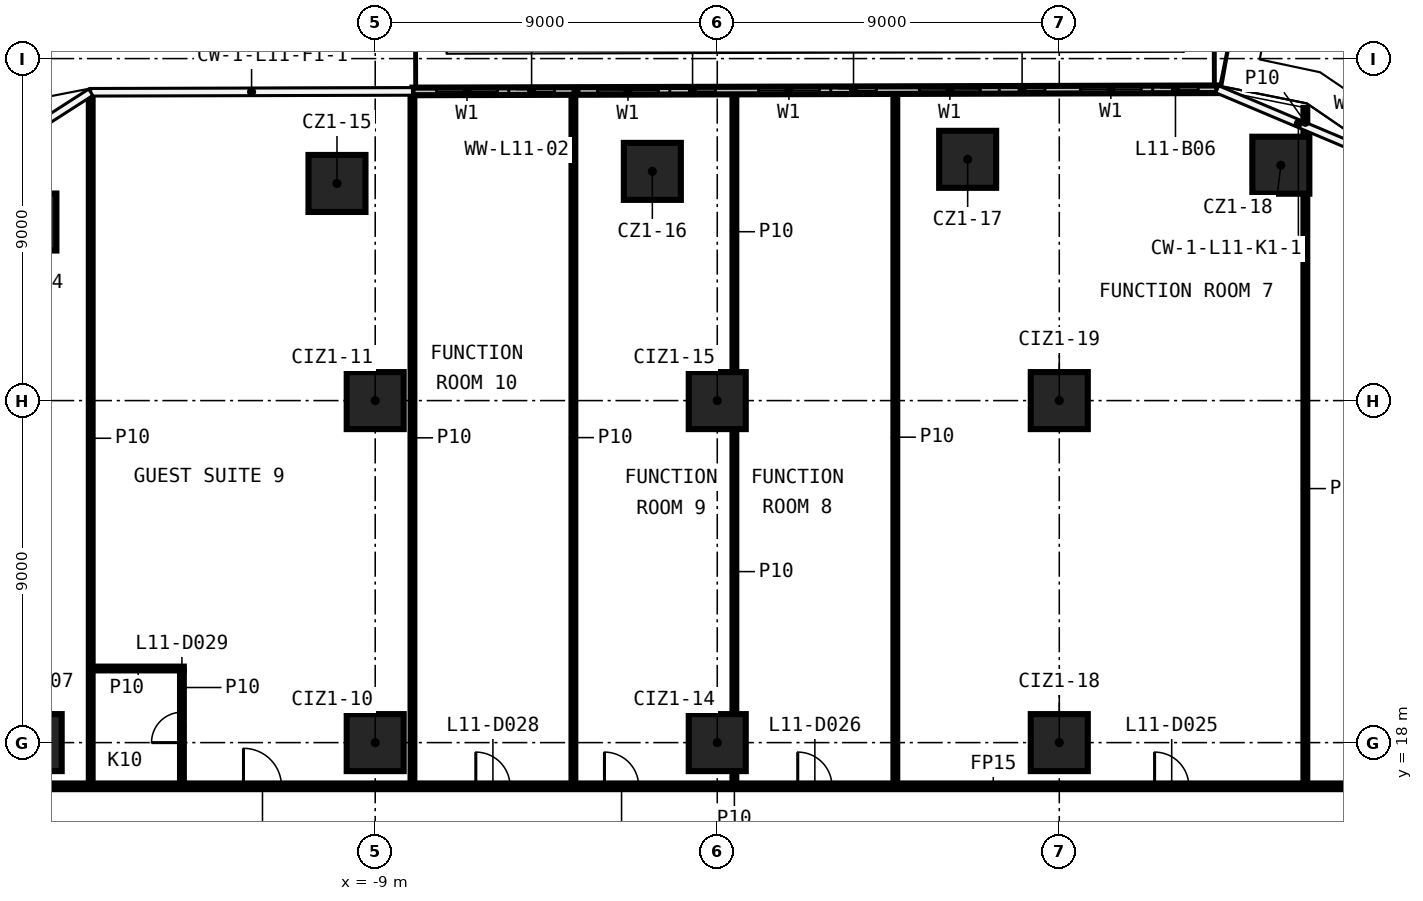
"""IFC4 building model, lengths in metres.
Left out: names, types, materials, properties, quantities, classifications, styles, units other than length and angle.
Written with IfcOpenShell. Run it as: python <this file> out.ifc"""

import sys

from ifc_helpers import new_model, si_unit, direction, frame, frame_2d, origin, origin_2d, place, context, subcontext, project, spatial, rectangle, extrude, element, fill, save


model = new_model("IFC4")
c1 = context("Model", 3, precision=1e-05, world=origin(), true_north=direction((0.0, 1.0)))
c2 = subcontext(c1, "Body", "Model", "MODEL_VIEW")
j1 = project(units=[si_unit("LENGTHUNIT", "METRE"), si_unit("PLANEANGLEUNIT", "RADIAN")], contexts=[c1])
p1 = place(None, origin())
s1 = spatial("IfcSite", under=j1, at=p1, CompositionType="ELEMENT")
p2 = place(p1, origin())
s2 = spatial("IfcBuilding", under=s1, at=p2, CompositionType="ELEMENT")
p3 = place(p2, frame((0.0, 0.0, 62.5)))
s3 = spatial("IfcBuildingStorey", under=s2, at=p3, CompositionType="ELEMENT", Elevation=62.5)
for number, where, z_axis, x_axis in (
    (1, (-18.139, 31.699, 0.0), (0.0, 0.0, 1.0), (1.0, 0.0, 0.0)),
    (2, (-10.006, 32.714, 0.0), (0.0, 0.0, 1.0), (1.0, 0.0, 0.0)),
    (3, (-1.708, 33.032, 0.0), (0.0, 0.0, 1.0), (1.0, 0.0, 0.0)),
    (4, (6.589, 33.349, 0.0), (0.0, 0.0, 1.0), (1.0, 0.0, 0.0)),
    (5, (14.83, 33.194, 0.0), (0.0, 0.0, 1.0), (1.0, 0.0, 0.0)),
    (6, (-18.0, 18.0, 0.0), (0.0, 0.0, 1.0), (1.0, 0.0, 0.0)),
    (7, (-9.0, 18.0, 0.0), (0.0, 0.0, 1.0), (1.0, 0.0, 0.0)),
    (8, (-9.0, 27.0, 0.0), (0.0, 0.0, 1.0), (1.0, 0.0, 0.0)),
    (9, (0.0, 18.0, 0.0), (0.0, 0.0, 1.0), (1.0, 0.0, 0.0)),
    (10, (0.0, 27.0, 0.0), (0.0, 0.0, 1.0), (1.0, 0.0, 0.0)),
    (11, (9.0, 18.0, 0.0), (0.0, 0.0, 1.0), (1.0, 0.0, 0.0)),
    (12, (9.0, 27.0, 0.0), (0.0, 0.0, 1.0), (1.0, 0.0, 0.0)),
):
    element("IfcColumn", number, at=place(p3, frame(where, z_axis=z_axis, x_axis=x_axis)), inside=s3, PredefinedType="COLUMN", context=c2, shape_type="SweptSolid", body=[
        extrude(rectangle(XDim=1.5, YDim=1.5, at=origin_2d()), origin(), (0.0, 0.0, 1.0), 3.3),
    ])
p4 = place(p3, frame((-19.925, 16.85, 0.0), z_axis=(0.0, 0.0, 1.0), x_axis=(1.0, 0.0, 0.0)))
e13 = element("IfcWall", 13, at=p4, inside=s3, PredefinedType="PARTITIONING", context=c2, shape_type="SweptSolid", body=[
    extrude(rectangle(XDim=39.85, YDim=0.15, at=frame_2d((19.925, 0.0))), origin(), (0.0, 0.0, 1.0), 3.3),
])
p5 = place(p4, frame((31.433, 0.0, 0.0)))
e14 = element("IfcOpeningElement", 14, at=p5, cuts=e13, PredefinedType="OPENING", context=c2, shape_type="SweptSolid", body=[
    extrude(rectangle(XDim=0.9, YDim=2.1, at=frame_2d((0.45, 1.05))), frame((0.0, 0.085, 0.0), z_axis=(0.0, -1.0, 0.0), x_axis=(1.0, 0.0, 0.0)), (0.0, 0.0, 1.0), 0.17),
])
p6 = place(p4, frame((22.043, 0.0, 0.0)))
e15 = element("IfcOpeningElement", 15, at=p6, cuts=e13, PredefinedType="OPENING", context=c2, shape_type="SweptSolid", body=[
    extrude(rectangle(XDim=0.9, YDim=2.1, at=frame_2d((0.45, 1.05))), frame((0.0, 0.085, 0.0), z_axis=(0.0, -1.0, 0.0), x_axis=(1.0, 0.0, 0.0)), (0.0, 0.0, 1.0), 0.17),
])
p7 = place(p4, frame((16.957, 0.0, 0.0)))
e16 = element("IfcOpeningElement", 16, at=p7, cuts=e13, PredefinedType="OPENING", context=c2, shape_type="SweptSolid", body=[
    extrude(rectangle(XDim=0.9, YDim=2.1, at=frame_2d((0.45, 1.05))), frame((0.0, 0.085, 0.0), z_axis=(0.0, -1.0, 0.0), x_axis=(1.0, 0.0, 0.0)), (0.0, 0.0, 1.0), 0.17),
])
p8 = place(p4, frame((13.572, 0.0, 0.0)))
e17 = element("IfcOpeningElement", 17, at=p8, cuts=e13, PredefinedType="OPENING", context=c2, shape_type="SweptSolid", body=[
    extrude(rectangle(XDim=0.9, YDim=2.1, at=frame_2d((0.45, 1.05))), frame((0.0, 0.085, 0.0), z_axis=(0.0, -1.0, 0.0), x_axis=(1.0, 0.0, 0.0)), (0.0, 0.0, 1.0), 0.17),
])
p9 = place(p4, frame((7.458, 0.0, 0.0)))
e18 = element("IfcOpeningElement", 18, at=p9, cuts=e13, PredefinedType="OPENING", context=c2, shape_type="SweptSolid", body=[
    extrude(rectangle(XDim=1.0, YDim=2.1, at=frame_2d((0.5, 1.05))), frame((0.0, 0.085, 0.0), z_axis=(0.0, -1.0, 0.0), x_axis=(1.0, 0.0, 0.0)), (0.0, 0.0, 1.0), 0.17),
])
p10 = place(p3, frame((-16.436, 19.95, 0.0), z_axis=(0.0, 0.0, 1.0), x_axis=(1.0, 0.0, 0.0)))
e19 = element("IfcWall", 19, at=p10, inside=s3, PredefinedType="PARTITIONING", context=c2, shape_type="SweptSolid", body=[
    extrude(rectangle(XDim=2.4, YDim=0.1, at=frame_2d((1.2, 0.0))), origin(), (0.0, 0.0, 1.0), 3.3),
])
p11 = place(p3, frame((15.475, 16.925, 0.0), z_axis=(0.0, 0.0, 1.0), x_axis=(0.0, 1.0, 0.0)))
e20 = element("IfcWall", 20, at=p11, inside=s3, PredefinedType="PARTITIONING", context=c2, shape_type="SweptSolid", body=[
    extrude(rectangle(XDim=15.519, YDim=0.1, at=frame_2d((7.76, 0.0))), origin(), (0.0, 0.0, 1.0), 3.3),
])
p12 = place(p3, frame((15.475, 33.944, 0.0), z_axis=(0.0, 0.0, 1.0), x_axis=(0.0, 1.0, 0.0)))
e21 = element("IfcWall", 21, at=p12, inside=s3, PredefinedType="PARTITIONING", context=c2, shape_type="SweptSolid", body=[
    extrude(rectangle(XDim=0.759, YDim=0.1, at=frame_2d((0.379, 0.0))), origin(), (0.0, 0.0, 1.0), 3.3),
])
p13 = place(p3, frame((4.686, 16.925, 0.0), z_axis=(0.0, 0.0, 1.0), x_axis=(0.0, 1.0, 0.0)))
e22 = element("IfcWall", 22, at=p13, inside=s3, PredefinedType="PARTITIONING", context=c2, shape_type="SweptSolid", body=[
    extrude(rectangle(XDim=18.225, YDim=0.1, at=frame_2d((9.112, 0.0))), origin(), (0.0, 0.0, 1.0), 3.3),
])
p14 = place(p3, frame((0.451, 16.925, 0.0), z_axis=(0.0, 0.0, 1.0), x_axis=(0.0, 1.0, 0.0)))
e23 = element("IfcWall", 23, at=p14, inside=s3, PredefinedType="PARTITIONING", context=c2, shape_type="SweptSolid", body=[
    extrude(rectangle(XDim=0.325, YDim=0.1, at=frame_2d((0.163, 0.0))), origin(), (0.0, 0.0, 1.0), 3.3),
])
p15 = place(p3, frame((0.451, 18.75, 0.0), z_axis=(0.0, 0.0, 1.0), x_axis=(0.0, 1.0, 0.0)))
e24 = element("IfcWall", 24, at=p15, inside=s3, PredefinedType="PARTITIONING", context=c2, shape_type="SweptSolid", body=[
    extrude(rectangle(XDim=7.5, YDim=0.1, at=frame_2d((3.75, 0.0))), origin(), (0.0, 0.0, 1.0), 3.3),
])
p16 = place(p3, frame((0.451, 27.75, 0.0), z_axis=(0.0, 0.0, 1.0), x_axis=(0.0, 1.0, 0.0)))
e25 = element("IfcWall", 25, at=p16, inside=s3, PredefinedType="PARTITIONING", context=c2, shape_type="SweptSolid", body=[
    extrude(rectangle(XDim=7.389, YDim=0.1, at=frame_2d((3.694, 0.0))), origin(), (0.0, 0.0, 1.0), 3.3),
])
p17 = place(p3, frame((-3.785, 16.925, 0.0), z_axis=(0.0, 0.0, 1.0), x_axis=(0.0, 1.0, 0.0)))
e26 = element("IfcWall", 26, at=p17, inside=s3, PredefinedType="PARTITIONING", context=c2, shape_type="SweptSolid", body=[
    extrude(rectangle(XDim=18.202, YDim=0.1, at=frame_2d((9.101, 0.0))), origin(), (0.0, 0.0, 1.0), 3.3),
])
p18 = place(p3, frame((-8.02, 16.925, 0.0), z_axis=(0.0, 0.0, 1.0), x_axis=(0.0, 1.0, 0.0)))
e27 = element("IfcWall", 27, at=p18, inside=s3, PredefinedType="PARTITIONING", context=c2, shape_type="SweptSolid", body=[
    extrude(rectangle(XDim=18.191, YDim=0.1, at=frame_2d((9.096, 0.0))), origin(), (0.0, 0.0, 1.0), 3.3),
])
p19 = place(p3, frame((-14.086, 16.925, 0.0), z_axis=(0.0, 0.0, 1.0), x_axis=(0.0, 1.0, 0.0)))
e28 = element("IfcWall", 28, at=p19, inside=s3, PredefinedType="PARTITIONING", context=c2, shape_type="SweptSolid", body=[
    extrude(rectangle(XDim=2.975, YDim=0.1, at=frame_2d((1.487, 0.0))), origin(), (0.0, 0.0, 1.0), 3.3),
])
p20 = place(p19, frame((1.075, 0.0, 0.0)))
e29 = element("IfcOpeningElement", 29, at=p20, cuts=e28, PredefinedType="OPENING", context=c2, shape_type="SweptSolid", body=[
    extrude(rectangle(XDim=0.8, YDim=2.1, at=frame_2d((0.4, 1.05))), frame((0.0, 0.06, 0.0), z_axis=(0.0, -1.0, 0.0), x_axis=(1.0, 0.0, 0.0)), (0.0, 0.0, 1.0), 0.12),
])
p21 = place(p3, frame((-16.486, 16.925, 0.0), z_axis=(0.0, 0.0, 1.0), x_axis=(0.0, 1.0, 0.0)))
e30 = element("IfcWall", 30, at=p21, inside=s3, PredefinedType="PARTITIONING", context=c2, shape_type="SweptSolid", body=[
    extrude(rectangle(XDim=18.168, YDim=0.1, at=frame_2d((9.084, 0.0))), origin(), (0.0, 0.0, 1.0), 3.3),
])
p22 = place(p3, frame((13.157, 35.193, 0.0), z_axis=(0.0, 0.0, 1.0), x_axis=(-0.99999645413, -0.00266302965, 0.0)))
e31 = element("IfcWall", 31, at=p22, inside=s3, PredefinedType="SOLIDWALL", context=c2, shape_type="SweptSolid", body=[
    extrude(rectangle(XDim=21.177, YDim=0.2, at=frame_2d((10.589, 0.0))), origin(), (0.0, 0.0, 1.0), 3.3),
])
p23 = place(p22, frame((2.0, 0.0, 0.6)))
e32 = element("IfcOpeningElement", 32, at=p23, cuts=e31, PredefinedType="OPENING", context=c2, shape_type="SweptSolid", body=[
    extrude(rectangle(XDim=1.6, YDim=2.4, at=frame_2d((0.8, 1.2))), frame((0.0, 0.11, 0.0), z_axis=(0.0, -1.0, 0.0), x_axis=(1.0, 0.0, 0.0)), (0.0, 0.0, 1.0), 0.22),
])
p24 = place(p22, frame((0.5, 0.0, 0.0)))
e33 = element("IfcOpeningElement", 33, at=p24, cuts=e31, PredefinedType="OPENING", context=c2, shape_type="SweptSolid", body=[
    extrude(rectangle(XDim=1.2, YDim=2.4, at=frame_2d((0.6, 1.2))), frame((0.0, 0.11, 0.0), z_axis=(0.0, -1.0, 0.0), x_axis=(1.0, 0.0, 0.0)), (0.0, 0.0, 1.0), 0.22),
])
p25 = place(p22, frame((6.236, 0.0, 0.6)))
e34 = element("IfcOpeningElement", 34, at=p25, cuts=e31, PredefinedType="OPENING", context=c2, shape_type="SweptSolid", body=[
    extrude(rectangle(XDim=1.6, YDim=2.4, at=frame_2d((0.8, 1.2))), frame((0.0, 0.11, 0.0), z_axis=(0.0, -1.0, 0.0), x_axis=(1.0, 0.0, 0.0)), (0.0, 0.0, 1.0), 0.22),
])
p26 = place(p22, frame((4.535, 0.0, 0.0)))
e35 = element("IfcOpeningElement", 35, at=p26, cuts=e31, PredefinedType="OPENING", context=c2, shape_type="SweptSolid", body=[
    extrude(rectangle(XDim=1.2, YDim=2.4, at=frame_2d((0.6, 1.2))), frame((0.0, 0.11, 0.0), z_axis=(0.0, -1.0, 0.0), x_axis=(1.0, 0.0, 0.0)), (0.0, 0.0, 1.0), 0.22),
])
p27 = place(p22, frame((10.471, 0.0, 0.6)))
e36 = element("IfcOpeningElement", 36, at=p27, cuts=e31, PredefinedType="OPENING", context=c2, shape_type="SweptSolid", body=[
    extrude(rectangle(XDim=1.6, YDim=2.4, at=frame_2d((0.8, 1.2))), frame((0.0, 0.11, 0.0), z_axis=(0.0, -1.0, 0.0), x_axis=(1.0, 0.0, 0.0)), (0.0, 0.0, 1.0), 0.22),
])
p28 = place(p22, frame((8.971, 0.0, 0.0)))
e37 = element("IfcOpeningElement", 37, at=p28, cuts=e31, PredefinedType="OPENING", context=c2, shape_type="SweptSolid", body=[
    extrude(rectangle(XDim=1.2, YDim=2.4, at=frame_2d((0.6, 1.2))), frame((0.0, 0.11, 0.0), z_axis=(0.0, -1.0, 0.0), x_axis=(1.0, 0.0, 0.0)), (0.0, 0.0, 1.0), 0.22),
])
p29 = place(p22, frame((14.707, 0.0, 0.6)))
e38 = element("IfcOpeningElement", 38, at=p29, cuts=e31, PredefinedType="OPENING", context=c2, shape_type="SweptSolid", body=[
    extrude(rectangle(XDim=1.6, YDim=2.4, at=frame_2d((0.8, 1.2))), frame((0.0, 0.11, 0.0), z_axis=(0.0, -1.0, 0.0), x_axis=(1.0, 0.0, 0.0)), (0.0, 0.0, 1.0), 0.22),
])
p30 = place(p22, frame((13.207, 0.0, 0.0)))
e39 = element("IfcOpeningElement", 39, at=p30, cuts=e31, PredefinedType="OPENING", context=c2, shape_type="SweptSolid", body=[
    extrude(rectangle(XDim=1.2, YDim=2.4, at=frame_2d((0.6, 1.2))), frame((0.0, 0.11, 0.0), z_axis=(0.0, -1.0, 0.0), x_axis=(1.0, 0.0, 0.0)), (0.0, 0.0, 1.0), 0.22),
])
p31 = place(p22, frame((18.942, 0.0, 0.6)))
e40 = element("IfcOpeningElement", 40, at=p31, cuts=e31, PredefinedType="OPENING", context=c2, shape_type="SweptSolid", body=[
    extrude(rectangle(XDim=1.6, YDim=2.4, at=frame_2d((0.8, 1.2))), frame((0.0, 0.11, 0.0), z_axis=(0.0, -1.0, 0.0), x_axis=(1.0, 0.0, 0.0)), (0.0, 0.0, 1.0), 0.22),
])
p32 = place(p22, frame((17.442, 0.0, 0.0)))
e41 = element("IfcOpeningElement", 41, at=p32, cuts=e31, PredefinedType="OPENING", context=c2, shape_type="SweptSolid", body=[
    extrude(rectangle(XDim=1.2, YDim=2.4, at=frame_2d((0.6, 1.2))), frame((0.0, 0.11, 0.0), z_axis=(0.0, -1.0, 0.0), x_axis=(1.0, 0.0, 0.0)), (0.0, 0.0, 1.0), 0.22),
])
p33 = place(p5, origin())
e42 = element("IfcDoor", 42, at=p33, inside=s3, OperationType="SINGLE_SWING_LEFT", PredefinedType="DOOR", context=c2, shape_type="SweptSolid", body=[
    extrude(rectangle(XDim=0.9, YDim=2.1, at=frame_2d((0.45, 1.05))), frame((0.0, 0.025, 0.0), z_axis=(0.0, -1.0, 0.0), x_axis=(1.0, 0.0, 0.0)), (0.0, 0.0, 1.0), 0.05),
])
fill(e14, e42)
p34 = place(p6, origin())
e43 = element("IfcDoor", 43, at=p34, inside=s3, OperationType="SINGLE_SWING_RIGHT", PredefinedType="DOOR", context=c2, shape_type="SweptSolid", body=[
    extrude(rectangle(XDim=0.9, YDim=2.1, at=frame_2d((0.45, 1.05))), frame((0.0, 0.025, 0.0), z_axis=(0.0, -1.0, 0.0), x_axis=(1.0, 0.0, 0.0)), (0.0, 0.0, 1.0), 0.05),
])
fill(e15, e43)
p35 = place(p7, origin())
e44 = element("IfcDoor", 44, at=p35, inside=s3, OperationType="SINGLE_SWING_LEFT", PredefinedType="DOOR", context=c2, shape_type="SweptSolid", body=[
    extrude(rectangle(XDim=0.9, YDim=2.1, at=frame_2d((0.45, 1.05))), frame((0.0, 0.025, 0.0), z_axis=(0.0, -1.0, 0.0), x_axis=(1.0, 0.0, 0.0)), (0.0, 0.0, 1.0), 0.05),
])
fill(e16, e44)
p36 = place(p8, origin())
e45 = element("IfcDoor", 45, at=p36, inside=s3, OperationType="SINGLE_SWING_RIGHT", PredefinedType="DOOR", context=c2, shape_type="SweptSolid", body=[
    extrude(rectangle(XDim=0.9, YDim=2.1, at=frame_2d((0.45, 1.05))), frame((0.0, 0.025, 0.0), z_axis=(0.0, -1.0, 0.0), x_axis=(1.0, 0.0, 0.0)), (0.0, 0.0, 1.0), 0.05),
])
fill(e17, e45)
p37 = place(p20, origin())
e46 = element("IfcDoor", 46, at=p37, inside=s3, OperationType="SINGLE_SWING_RIGHT", PredefinedType="DOOR", context=c2, shape_type="SweptSolid", body=[
    extrude(rectangle(XDim=0.8, YDim=2.1, at=frame_2d((0.4, 1.05))), frame((0.0, 0.025, 0.0), z_axis=(0.0, -1.0, 0.0), x_axis=(1.0, 0.0, 0.0)), (0.0, 0.0, 1.0), 0.05),
])
fill(e29, e46)
p38 = place(p9, origin())
e47 = element("IfcDoor", 47, at=p38, inside=s3, OperationType="SINGLE_SWING_LEFT", PredefinedType="DOOR", context=c2, shape_type="SweptSolid", body=[
    extrude(rectangle(XDim=1.0, YDim=2.1, at=frame_2d((0.5, 1.05))), frame((0.0, 0.025, 0.0), z_axis=(0.0, -1.0, 0.0), x_axis=(1.0, 0.0, 0.0)), (0.0, 0.0, 1.0), 0.05),
])
fill(e18, e47)
p39 = place(p23, origin())
e48 = element("IfcWindow", 48, at=p39, inside=s3, PartitioningType="SINGLE_PANEL", PredefinedType="WINDOW", context=c2, shape_type="SweptSolid", body=[
    extrude(rectangle(XDim=1.6, YDim=2.4, at=frame_2d((0.8, 1.2))), frame((0.0, 0.03, 0.0), z_axis=(0.0, -1.0, 0.0), x_axis=(1.0, 0.0, 0.0)), (0.0, 0.0, 1.0), 0.06),
])
fill(e32, e48)
p40 = place(p24, origin())
e49 = element("IfcDoor", 49, at=p40, inside=s3, OperationType="SLIDING_TO_LEFT", PredefinedType="DOOR", context=c2, shape_type="SweptSolid", body=[
    extrude(rectangle(XDim=1.2, YDim=2.4, at=frame_2d((0.6, 1.2))), frame((0.0, 0.025, 0.0), z_axis=(0.0, -1.0, 0.0), x_axis=(1.0, 0.0, 0.0)), (0.0, 0.0, 1.0), 0.05),
])
fill(e33, e49)
p41 = place(p25, origin())
e50 = element("IfcWindow", 50, at=p41, inside=s3, PartitioningType="SINGLE_PANEL", PredefinedType="WINDOW", context=c2, shape_type="SweptSolid", body=[
    extrude(rectangle(XDim=1.6, YDim=2.4, at=frame_2d((0.8, 1.2))), frame((0.0, 0.03, 0.0), z_axis=(0.0, -1.0, 0.0), x_axis=(1.0, 0.0, 0.0)), (0.0, 0.0, 1.0), 0.06),
])
fill(e34, e50)
p42 = place(p26, origin())
e51 = element("IfcDoor", 51, at=p42, inside=s3, OperationType="SLIDING_TO_LEFT", PredefinedType="DOOR", context=c2, shape_type="SweptSolid", body=[
    extrude(rectangle(XDim=1.2, YDim=2.4, at=frame_2d((0.6, 1.2))), frame((0.0, 0.025, 0.0), z_axis=(0.0, -1.0, 0.0), x_axis=(1.0, 0.0, 0.0)), (0.0, 0.0, 1.0), 0.05),
])
fill(e35, e51)
p43 = place(p27, origin())
e52 = element("IfcWindow", 52, at=p43, inside=s3, PartitioningType="SINGLE_PANEL", PredefinedType="WINDOW", context=c2, shape_type="SweptSolid", body=[
    extrude(rectangle(XDim=1.6, YDim=2.4, at=frame_2d((0.8, 1.2))), frame((0.0, 0.03, 0.0), z_axis=(0.0, -1.0, 0.0), x_axis=(1.0, 0.0, 0.0)), (0.0, 0.0, 1.0), 0.06),
])
fill(e36, e52)
p44 = place(p28, origin())
e53 = element("IfcDoor", 53, at=p44, inside=s3, OperationType="SLIDING_TO_LEFT", PredefinedType="DOOR", context=c2, shape_type="SweptSolid", body=[
    extrude(rectangle(XDim=1.2, YDim=2.4, at=frame_2d((0.6, 1.2))), frame((0.0, 0.025, 0.0), z_axis=(0.0, -1.0, 0.0), x_axis=(1.0, 0.0, 0.0)), (0.0, 0.0, 1.0), 0.05),
])
fill(e37, e53)
p45 = place(p29, origin())
e54 = element("IfcWindow", 54, at=p45, inside=s3, PartitioningType="SINGLE_PANEL", PredefinedType="WINDOW", context=c2, shape_type="SweptSolid", body=[
    extrude(rectangle(XDim=1.6, YDim=2.4, at=frame_2d((0.8, 1.2))), frame((0.0, 0.03, 0.0), z_axis=(0.0, -1.0, 0.0), x_axis=(1.0, 0.0, 0.0)), (0.0, 0.0, 1.0), 0.06),
])
fill(e38, e54)
p46 = place(p30, origin())
e55 = element("IfcDoor", 55, at=p46, inside=s3, OperationType="SLIDING_TO_LEFT", PredefinedType="DOOR", context=c2, shape_type="SweptSolid", body=[
    extrude(rectangle(XDim=1.2, YDim=2.4, at=frame_2d((0.6, 1.2))), frame((0.0, 0.025, 0.0), z_axis=(0.0, -1.0, 0.0), x_axis=(1.0, 0.0, 0.0)), (0.0, 0.0, 1.0), 0.05),
])
fill(e39, e55)
p47 = place(p31, origin())
e56 = element("IfcWindow", 56, at=p47, inside=s3, PartitioningType="SINGLE_PANEL", PredefinedType="WINDOW", context=c2, shape_type="SweptSolid", body=[
    extrude(rectangle(XDim=1.6, YDim=2.4, at=frame_2d((0.8, 1.2))), frame((0.0, 0.03, 0.0), z_axis=(0.0, -1.0, 0.0), x_axis=(1.0, 0.0, 0.0)), (0.0, 0.0, 1.0), 0.06),
])
fill(e40, e56)
p48 = place(p32, origin())
e57 = element("IfcDoor", 57, at=p48, inside=s3, OperationType="SLIDING_TO_LEFT", PredefinedType="DOOR", context=c2, shape_type="SweptSolid", body=[
    extrude(rectangle(XDim=1.2, YDim=2.4, at=frame_2d((0.6, 1.2))), frame((0.0, 0.025, 0.0), z_axis=(0.0, -1.0, 0.0), x_axis=(1.0, 0.0, 0.0)), (0.0, 0.0, 1.0), 0.05),
])
fill(e41, e57)
save(model, sys.argv[1])
